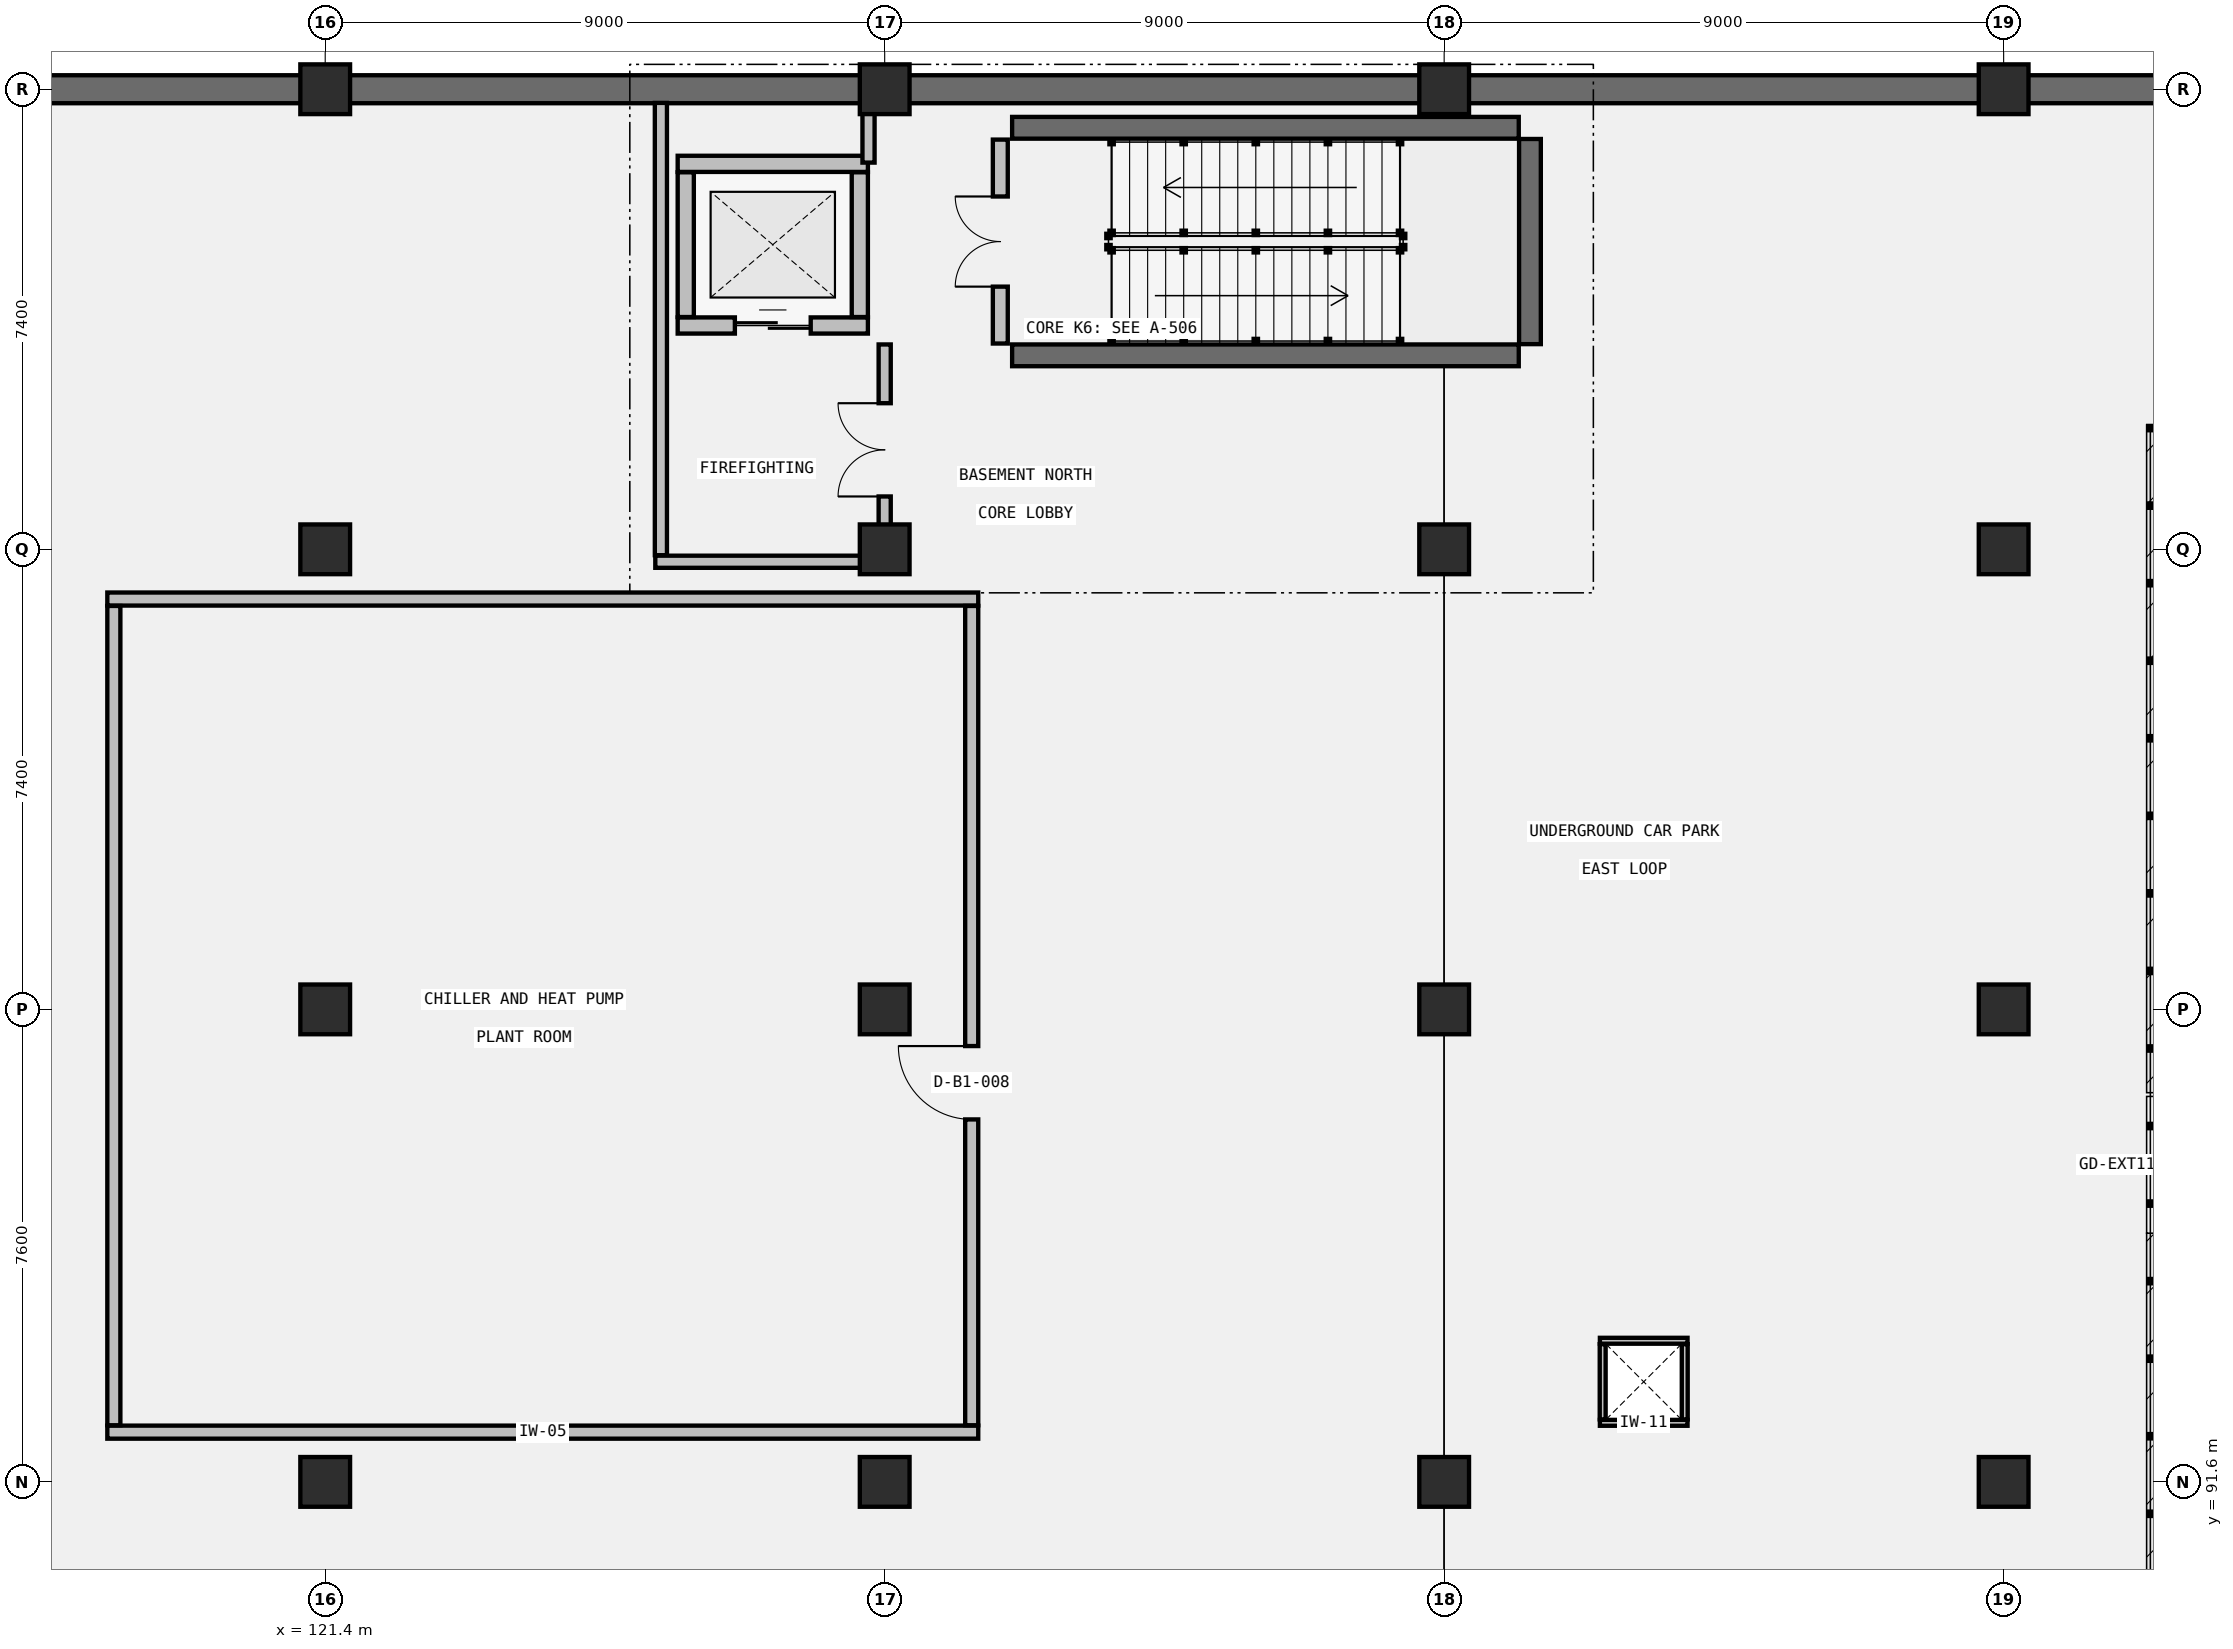
"""IFC4 building model, lengths in metres.
Left out: names, types, materials, properties, quantities, classifications, styles, units other than length and angle.
Written with IfcOpenShell. Run it as: python <this file> out.ifc"""

import sys

from ifc_helpers import new_model, si_unit, direction, frame, frame_2d, origin, origin_2d, place, context, subcontext, project, spatial, rectangle, extrude, element, fill, save


model = new_model("IFC4")
c1 = context("Model", 3, precision=1e-05, world=origin(), true_north=direction((0.0, 1.0)))
c2 = subcontext(c1, "Body", "Model", "MODEL_VIEW")
j1 = project(units=[si_unit("LENGTHUNIT", "METRE"), si_unit("PLANEANGLEUNIT", "RADIAN")], contexts=[c1])
p1 = place(None, origin())
s1 = spatial("IfcSite", under=j1, at=p1, CompositionType="ELEMENT")
p2 = place(p1, origin())
s2 = spatial("IfcBuilding", under=s1, at=p2, CompositionType="ELEMENT")
p3 = place(p2, frame((0.0, 0.0, -5.4)))
s3 = spatial("IfcBuildingStorey", under=s2, at=p3, CompositionType="ELEMENT", Elevation=-5.4)
for number, where, z_axis, x_axis in (
    (1, (121.4, 91.6, 0.0), (0.0, 0.0, 1.0), (1.0, 0.0, 0.0)),
    (2, (121.4, 99.2, 0.0), (0.0, 0.0, 1.0), (1.0, 0.0, 0.0)),
    (3, (121.4, 106.6, 0.0), (0.0, 0.0, 1.0), (1.0, 0.0, 0.0)),
    (4, (121.4, 114.0, 0.0), (0.0, 0.0, 1.0), (1.0, 0.0, 0.0)),
    (5, (130.4, 91.6, 0.0), (0.0, 0.0, 1.0), (1.0, 0.0, 0.0)),
    (6, (130.4, 99.2, 0.0), (0.0, 0.0, 1.0), (1.0, 0.0, 0.0)),
    (7, (130.4, 106.6, 0.0), (0.0, 0.0, 1.0), (1.0, 0.0, 0.0)),
    (8, (130.4, 114.0, 0.0), (0.0, 0.0, 1.0), (1.0, 0.0, 0.0)),
    (9, (139.4, 91.6, 0.0), (0.0, 0.0, 1.0), (1.0, 0.0, 0.0)),
    (10, (139.4, 99.2, 0.0), (0.0, 0.0, 1.0), (1.0, 0.0, 0.0)),
    (11, (139.4, 106.6, 0.0), (0.0, 0.0, 1.0), (1.0, 0.0, 0.0)),
    (12, (139.4, 114.0, 0.0), (0.0, 0.0, 1.0), (1.0, 0.0, 0.0)),
    (13, (148.4, 91.6, 0.0), (0.0, 0.0, 1.0), (1.0, 0.0, 0.0)),
    (14, (148.4, 99.2, 0.0), (0.0, 0.0, 1.0), (1.0, 0.0, 0.0)),
    (15, (148.4, 106.6, 0.0), (0.0, 0.0, 1.0), (1.0, 0.0, 0.0)),
    (16, (148.4, 114.0, 0.0), (0.0, 0.0, 1.0), (1.0, 0.0, 0.0)),
):
    element("IfcColumn", number, at=place(p3, frame(where, z_axis=z_axis, x_axis=x_axis)), inside=s3, PredefinedType="COLUMN", context=c2, shape_type="SweptSolid", body=[
        extrude(rectangle(XDim=0.8, YDim=0.8, at=origin_2d()), origin(), (0.0, 0.0, 1.0), 5.4),
    ])
p4 = place(p3, frame((156.9, 114.0, 0.0), z_axis=(0.0, 0.0, 1.0), x_axis=(-1.0, 0.0, 0.0)))
e17 = element("IfcWall", 17, at=p4, inside=s3, PredefinedType="SHEAR", context=c2, shape_type="SweptSolid", body=[
    extrude(rectangle(XDim=112.2, YDim=0.45, at=frame_2d((56.1, 0.0))), origin(), (0.0, 0.0, 1.0), 5.1),
])
p5 = place(p3, frame((132.45, 109.72, 0.0), z_axis=(0.0, 0.0, 1.0), x_axis=(1.0, 0.0, 0.0)))
e18 = element("IfcWall", 18, at=p5, inside=s3, PredefinedType="SHEAR", context=c2, shape_type="SweptSolid", body=[
    extrude(rectangle(XDim=8.15, YDim=0.35, at=frame_2d((4.075, 0.0))), origin(), (0.0, 0.0, 1.0), 5.1),
])
p6 = place(p3, frame((140.78, 109.9, 0.0), z_axis=(0.0, 0.0, 1.0), x_axis=(0.0, 1.0, 0.0)))
e19 = element("IfcWall", 19, at=p6, inside=s3, PredefinedType="SHEAR", context=c2, shape_type="SweptSolid", body=[
    extrude(rectangle(XDim=3.3, YDim=0.35, at=frame_2d((1.65, 0.0))), origin(), (0.0, 0.0, 1.0), 5.1),
])
p7 = place(p3, frame((140.6, 113.38, 0.0), z_axis=(0.0, 0.0, 1.0), x_axis=(-1.0, 0.0, 0.0)))
e20 = element("IfcWall", 20, at=p7, inside=s3, PredefinedType="SHEAR", context=c2, shape_type="SweptSolid", body=[
    extrude(rectangle(XDim=8.15, YDim=0.35, at=frame_2d((4.075, 0.0))), origin(), (0.0, 0.0, 1.0), 5.1),
])
for number, where, z_axis, x_axis in (
    (21, (141.905, 92.55, 0.0), (0.0, 0.0, 1.0), (1.0, 0.0, 0.0)),
    (22, (141.905, 93.87, 0.0), (0.0, 0.0, 1.0), (1.0, 0.0, 0.0)),
):
    element("IfcWall", number, at=place(p3, frame(where, z_axis=z_axis, x_axis=x_axis)), inside=s3, PredefinedType="PARTITIONING", context=c2, shape_type="SweptSolid", body=[
        extrude(rectangle(XDim=1.41, YDim=0.095, at=frame_2d((0.705, 0.0))), origin(), (0.0, 0.0, 1.0), 5.1),
    ])
for number, where, z_axis, x_axis in (
    (23, (141.95, 92.605, 0.0), (0.0, 0.0, 1.0), (0.0, 1.0, 0.0)),
    (24, (143.27, 92.605, 0.0), (0.0, 0.0, 1.0), (0.0, 1.0, 0.0)),
):
    element("IfcWall", number, at=place(p3, frame(where, z_axis=z_axis, x_axis=x_axis)), inside=s3, PredefinedType="PARTITIONING", context=c2, shape_type="SweptSolid", body=[
        extrude(rectangle(XDim=1.21, YDim=0.095, at=frame_2d((0.605, 0.0))), origin(), (0.0, 0.0, 1.0), 5.1),
    ])
p8 = place(p3, frame((132.26, 109.91, 0.0), z_axis=(0.0, 0.0, 1.0), x_axis=(0.0, 1.0, 0.0)))
e25 = element("IfcWall", 25, at=p8, inside=s3, PredefinedType="STANDARD", context=c2, shape_type="SweptSolid", body=[
    extrude(rectangle(XDim=3.28, YDim=0.24, at=frame_2d((1.64, 0.0))), origin(), (0.0, 0.0, 1.0), 5.1),
])
p9 = place(p8, frame((0.915, 0.0, 0.0)))
e26 = element("IfcOpeningElement", 26, at=p9, cuts=e25, PredefinedType="OPENING", context=c2, shape_type="SweptSolid", body=[
    extrude(rectangle(XDim=1.45, YDim=2.2, at=frame_2d((0.725, 1.1))), frame((0.0, 0.13, 0.0), z_axis=(0.0, -1.0, 0.0), x_axis=(1.0, 0.0, 0.0)), (0.0, 0.0, 1.0), 0.26),
])
p10 = place(p3, frame((127.07, 110.2, 0.0), z_axis=(0.0, 0.0, 1.0), x_axis=(1.0, 0.0, 0.0)))
e27 = element("IfcWall", 27, at=p10, inside=s3, PredefinedType="STANDARD", context=c2, shape_type="SweptSolid", body=[
    extrude(rectangle(XDim=3.06, YDim=0.26, at=frame_2d((1.53, 0.0))), origin(), (0.0, 0.0, 1.0), 4.128),
])
p11 = place(p10, frame((0.92, 0.0, 0.0)))
e28 = element("IfcOpeningElement", 28, at=p11, cuts=e27, PredefinedType="OPENING", context=c2, shape_type="SweptSolid", body=[
    extrude(rectangle(XDim=1.22, YDim=2.2, at=frame_2d((0.61, 1.1))), frame((0.0, 0.14, 0.0), z_axis=(0.0, -1.0, 0.0), x_axis=(1.0, 0.0, 0.0)), (0.0, 0.0, 1.0), 0.28),
])
p12 = place(p3, frame((127.07, 112.8, 0.0), z_axis=(0.0, 0.0, 1.0), x_axis=(1.0, 0.0, 0.0)))
e29 = element("IfcWall", 29, at=p12, inside=s3, PredefinedType="STANDARD", context=c2, shape_type="SweptSolid", body=[
    extrude(rectangle(XDim=3.06, YDim=0.26, at=frame_2d((1.53, 0.0))), origin(), (0.0, 0.0, 1.0), 4.128),
])
for number, where, z_axis, x_axis in (
    (30, (127.2, 110.336, 0.0), (0.0, 0.0, 1.0), (0.0, 1.0, 0.0)),
    (31, (130.0, 110.336, 0.0), (0.0, 0.0, 1.0), (0.0, 1.0, 0.0)),
):
    element("IfcWall", number, at=place(p3, frame(where, z_axis=z_axis, x_axis=x_axis)), inside=s3, PredefinedType="STANDARD", context=c2, shape_type="SweptSolid", body=[
        extrude(rectangle(XDim=2.328, YDim=0.26, at=frame_2d((1.164, 0.0))), origin(), (0.0, 0.0, 1.0), 5.1),
    ])
p13 = place(p3, frame((126.8, 106.505, 0.0), z_axis=(0.0, 0.0, 1.0), x_axis=(0.0, 1.0, 0.0)))
e32 = element("IfcWall", 32, at=p13, inside=s3, PredefinedType="PARTITIONING", context=c2, shape_type="SweptSolid", body=[
    extrude(rectangle(XDim=7.275, YDim=0.195, at=frame_2d((3.638, 0.0))), origin(), (0.0, 0.0, 1.0), 3.978),
])
p14 = place(p3, frame((126.71, 106.4, 0.0), z_axis=(0.0, 0.0, 1.0), x_axis=(1.0, 0.0, 0.0)))
e33 = element("IfcWall", 33, at=p14, inside=s3, PredefinedType="PARTITIONING", context=c2, shape_type="SweptSolid", body=[
    extrude(rectangle(XDim=3.78, YDim=0.195, at=frame_2d((1.89, 0.0))), origin(), (0.0, 0.0, 1.0), 3.978),
])
p15 = place(p3, frame((130.4, 106.505, 0.0), z_axis=(0.0, 0.0, 1.0), x_axis=(0.0, 1.0, 0.0)))
e34 = element("IfcWall", 34, at=p15, inside=s3, PredefinedType="PARTITIONING", context=c2, shape_type="SweptSolid", body=[
    extrude(rectangle(XDim=3.39, YDim=0.195, at=frame_2d((1.695, 0.0))), origin(), (0.0, 0.0, 1.0), 4.128),
])
p16 = place(p15, frame((0.945, 0.0, 0.0)))
e35 = element("IfcOpeningElement", 35, at=p16, cuts=e34, PredefinedType="OPENING", context=c2, shape_type="SweptSolid", body=[
    extrude(rectangle(XDim=1.5, YDim=2.2, at=frame_2d((0.75, 1.1))), frame((0.0, 0.107, 0.0), z_axis=(0.0, -1.0, 0.0), x_axis=(1.0, 0.0, 0.0)), (0.0, 0.0, 1.0), 0.215),
])
p17 = place(p3, frame((130.14, 112.82, 0.0), z_axis=(0.0, 0.0, 1.0), x_axis=(0.0, 1.0, 0.0)))
e36 = element("IfcWall", 36, at=p17, inside=s3, PredefinedType="PARTITIONING", context=c2, shape_type="SweptSolid", body=[
    extrude(rectangle(XDim=0.96, YDim=0.195, at=frame_2d((0.48, 0.0))), origin(), (0.0, 0.0, 1.0), 4.128),
])
for number, where, z_axis, x_axis in (
    (37, (117.895, 92.4, 0.0), (0.0, 0.0, 1.0), (1.0, 0.0, 0.0)),
    (38, (117.895, 105.8, 0.0), (0.0, 0.0, 1.0), (1.0, 0.0, 0.0)),
):
    element("IfcWall", number, at=place(p3, frame(where, z_axis=z_axis, x_axis=x_axis)), inside=s3, PredefinedType="PARTITIONING", context=c2, shape_type="SweptSolid", body=[
        extrude(rectangle(XDim=14.01, YDim=0.21, at=frame_2d((7.005, 0.0))), origin(), (0.0, 0.0, 1.0), 4.128),
    ])
p18 = place(p3, frame((131.8, 92.511, 0.0), z_axis=(0.0, 0.0, 1.0), x_axis=(0.0, 1.0, 0.0)))
e39 = element("IfcWall", 39, at=p18, inside=s3, PredefinedType="PARTITIONING", context=c2, shape_type="SweptSolid", body=[
    extrude(rectangle(XDim=13.178, YDim=0.21, at=frame_2d((6.589, 0.0))), origin(), (0.0, 0.0, 1.0), 3.978),
])
p19 = place(p18, frame((4.919, 0.0, 0.0)))
e40 = element("IfcOpeningElement", 40, at=p19, cuts=e39, PredefinedType="OPENING", context=c2, shape_type="SweptSolid", body=[
    extrude(rectangle(XDim=1.18, YDim=2.22, at=frame_2d((0.59, 1.11))), frame((0.0, 0.115, 0.0), z_axis=(0.0, -1.0, 0.0), x_axis=(1.0, 0.0, 0.0)), (0.0, 0.0, 1.0), 0.23),
])
p20 = place(p3, frame((118.0, 92.511, 0.0), z_axis=(0.0, 0.0, 1.0), x_axis=(0.0, 1.0, 0.0)))
e41 = element("IfcWall", 41, at=p20, inside=s3, PredefinedType="PARTITIONING", context=c2, shape_type="SweptSolid", body=[
    extrude(rectangle(XDim=13.178, YDim=0.21, at=frame_2d((6.589, 0.0))), origin(), (0.0, 0.0, 1.0), 3.978),
])
p21 = place(p9, origin())
e42 = element("IfcDoor", 42, at=p21, inside=s3, OperationType="DOUBLE_DOOR_SINGLE_SWING", PredefinedType="DOOR", context=c2, shape_type="SweptSolid", body=[
    extrude(rectangle(XDim=1.45, YDim=2.2, at=frame_2d((0.725, 1.1))), frame((0.0, 0.025, 0.0), z_axis=(0.0, -1.0, 0.0), x_axis=(1.0, 0.0, 0.0)), (0.0, 0.0, 1.0), 0.05),
])
fill(e26, e42)
p22 = place(p11, origin())
e43 = element("IfcDoor", 43, at=p22, inside=s3, OperationType="SLIDING_TO_RIGHT", PredefinedType="DOOR", context=c2, shape_type="SweptSolid", body=[
    extrude(rectangle(XDim=1.22, YDim=2.2, at=frame_2d((0.61, 1.1))), frame((0.0, 0.025, 0.0), z_axis=(0.0, -1.0, 0.0), x_axis=(1.0, 0.0, 0.0)), (0.0, 0.0, 1.0), 0.05),
])
fill(e28, e43)
p23 = place(p16, origin())
e44 = element("IfcDoor", 44, at=p23, inside=s3, OperationType="DOUBLE_DOOR_SINGLE_SWING", PredefinedType="DOOR", context=c2, shape_type="SweptSolid", body=[
    extrude(rectangle(XDim=1.5, YDim=2.2, at=frame_2d((0.75, 1.1))), frame((0.0, 0.025, 0.0), z_axis=(0.0, -1.0, 0.0), x_axis=(1.0, 0.0, 0.0)), (0.0, 0.0, 1.0), 0.05),
])
fill(e35, e44)
p24 = place(p19, origin())
e45 = element("IfcDoor", 45, at=p24, inside=s3, OperationType="SINGLE_SWING_RIGHT", PredefinedType="DOOR", context=c2, shape_type="SweptSolid", body=[
    extrude(rectangle(XDim=1.18, YDim=2.22, at=frame_2d((0.59, 1.11))), frame((0.0, 0.025, 0.0), z_axis=(0.0, -1.0, 0.0), x_axis=(1.0, 0.0, 0.0)), (0.0, 0.0, 1.0), 0.05),
])
fill(e40, e45)
save(model, sys.argv[1])
